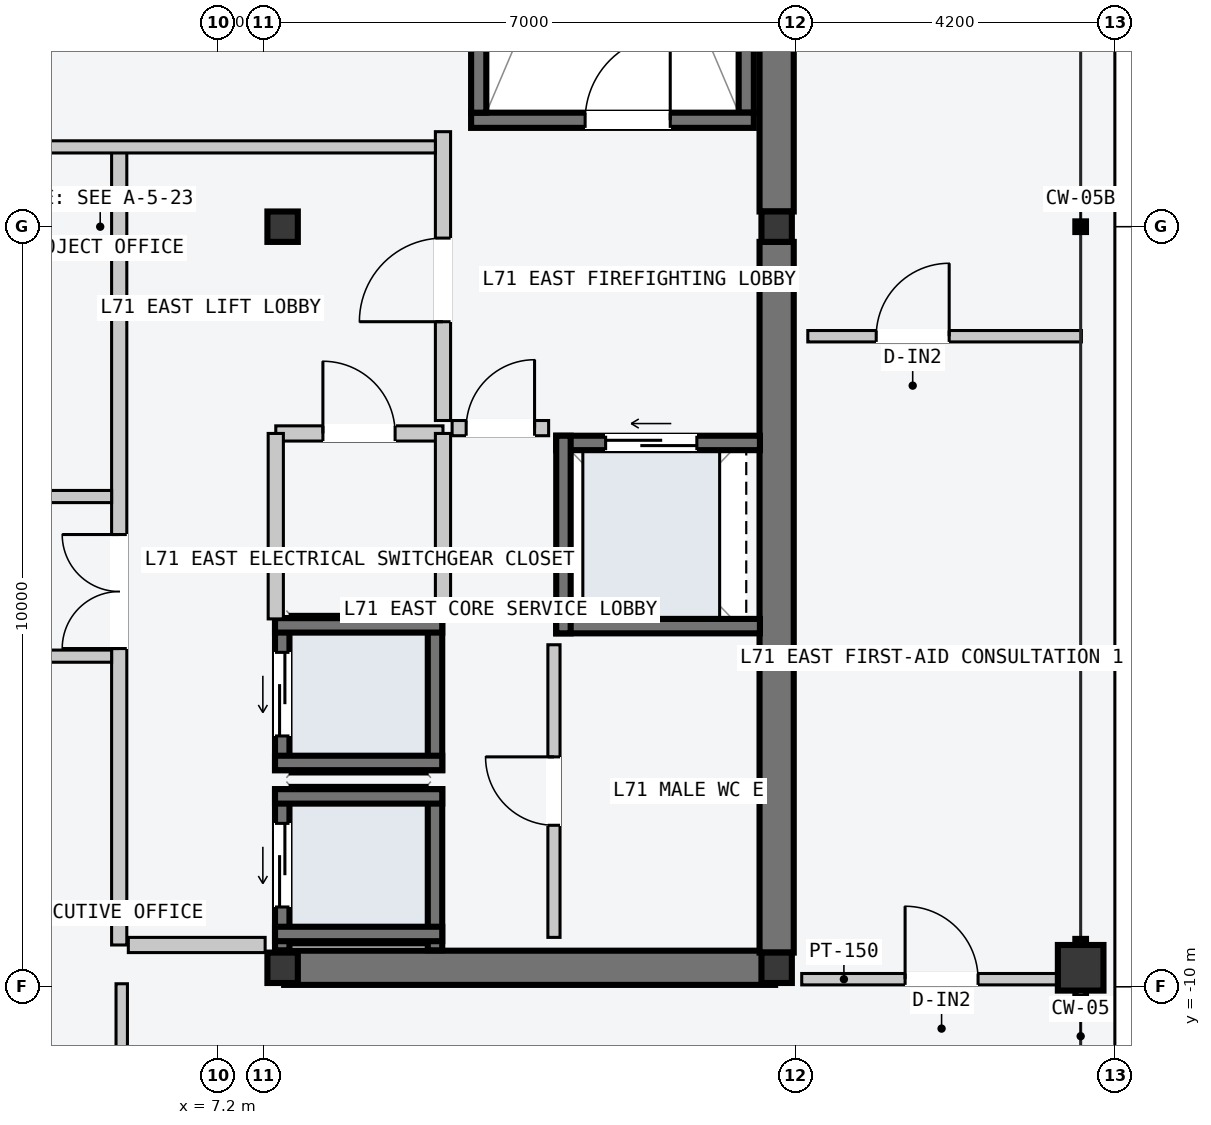
"""IFC4 building model, lengths in metres.
Left out: names, types, materials, properties, quantities, classifications, styles, units other than length and angle.
Written with IfcOpenShell. Run it as: python <this file> out.ifc"""

import sys

from ifc_helpers import new_model, si_unit, direction, frame, frame_2d, origin, origin_2d, place, context, subcontext, project, spatial, rectangle, hollow_rectangle, i_section, extrude, element, fill, save


model = new_model("IFC4")
c1 = context("Model", 3, precision=1e-05, world=origin(), true_north=direction((0.0, 1.0)))
c2 = subcontext(c1, "Body", "Model", "MODEL_VIEW")
j1 = project(units=[si_unit("LENGTHUNIT", "METRE"), si_unit("PLANEANGLEUNIT", "RADIAN")], contexts=[c1])
p1 = place(None, origin())
s1 = spatial("IfcSite", under=j1, at=p1, CompositionType="ELEMENT")
p2 = place(p1, origin())
s2 = spatial("IfcBuilding", under=s1, at=p2, CompositionType="ELEMENT")
p3 = place(p2, frame((0.0, 0.0, 268.8)))
s3 = spatial("IfcBuildingStorey", under=s2, at=p3, CompositionType="ELEMENT", Elevation=268.8)
p4 = place(p3, frame((8.07, -9.75, -0.2), z_axis=(0.0, 0.0, 1.0), x_axis=(1.0, 0.0, 0.0)))
e1 = element("IfcWall", 1, at=p4, inside=s3, PredefinedType="SHEAR", context=c2, shape_type="SweptSolid", body=[
    extrude(rectangle(XDim=6.46, YDim=0.45, at=frame_2d((3.23, 0.0))), origin(), (0.0, 0.0, 1.0), 3.6),
])
for number, where, z_axis, x_axis in (
    (2, (14.55, -9.55, -0.2), (0.0, 0.0, 1.0), (0.0, 1.0, 0.0)),
    (3, (14.55, 0.2, -0.2), (0.0, 0.0, 1.0), (0.0, 1.0, 0.0)),
):
    element("IfcWall", number, at=place(p3, frame(where, z_axis=z_axis, x_axis=x_axis)), inside=s3, PredefinedType="SHEAR", context=c2, shape_type="SweptSolid", body=[
        extrude(rectangle(XDim=9.35, YDim=0.45, at=frame_2d((4.675, 0.0))), origin(), (0.0, 0.0, 1.0), 3.6),
    ])
p5 = place(p3, frame((14.15, 1.5, -0.2), z_axis=(0.0, 0.0, 1.0), x_axis=(0.0, 1.0, 0.0)))
e4 = element("IfcWall", 4, at=p5, inside=s3, PredefinedType="SOLIDWALL", context=c2, shape_type="SweptSolid", body=[
    extrude(rectangle(XDim=7.8, YDim=0.2, at=frame_2d((3.9, 0.0))), origin(), (0.0, 0.0, 1.0), 3.6),
])
p6 = place(p3, frame((10.53, 1.4, -0.2), z_axis=(0.0, 0.0, 1.0), x_axis=(1.0, 0.0, 0.0)))
e5 = element("IfcWall", 5, at=p6, inside=s3, PredefinedType="SOLIDWALL", context=c2, shape_type="SweptSolid", body=[
    extrude(rectangle(XDim=3.72, YDim=0.2, at=frame_2d((1.86, 0.0))), origin(), (0.0, 0.0, 1.0), 3.6),
])
p7 = place(p6, frame((1.5, 0.0, 0.2)))
e6 = element("IfcOpeningElement", 6, at=p7, cuts=e5, PredefinedType="OPENING", context=c2, shape_type="SweptSolid", body=[
    extrude(rectangle(XDim=1.12, YDim=2.18, at=frame_2d((0.56, 1.09))), frame((0.0, 0.11, 0.0), z_axis=(0.0, -1.0, 0.0), x_axis=(1.0, 0.0, 0.0)), (0.0, 0.0, 1.0), 0.22),
])
p8 = place(p3, frame((10.63, 1.5, -0.2), z_axis=(0.0, 0.0, 1.0), x_axis=(0.0, 1.0, 0.0)))
e7 = element("IfcWall", 7, at=p8, inside=s3, PredefinedType="SOLIDWALL", context=c2, shape_type="SweptSolid", body=[
    extrude(rectangle(XDim=7.8, YDim=0.2, at=frame_2d((3.9, 0.0))), origin(), (0.0, 0.0, 1.0), 3.6),
])
for number, where, z_axis, x_axis in (
    (8, (8.05, -9.75, 0.0), (0.0, 0.0, 1.0), (1.0, 0.0, 0.0)),
    (9, (8.05, 0.0, 0.0), (0.0, 0.0, 1.0), (1.0, 0.0, 0.0)),
    (10, (14.55, -9.75, 0.0), (0.0, 0.0, 1.0), (1.0, 0.0, 0.0)),
    (11, (14.55, 0.0, 0.0), (0.0, 0.0, 1.0), (1.0, 0.0, 0.0)),
):
    element("IfcColumn", number, at=place(p3, frame(where, z_axis=z_axis, x_axis=x_axis)), inside=s3, PredefinedType="COLUMN", context=c2, shape_type="SweptSolid", body=[
        extrude(i_section(OverallWidth=0.4, OverallDepth=0.4, WebThickness=0.013, FlangeThickness=0.021, at=origin_2d()), origin(), (0.0, 0.0, 1.0), 3.6),
    ])
p9 = place(p3, frame((18.55, -9.75, 0.0), z_axis=(0.0, 0.0, 1.0), x_axis=(0.0, 1.0, 0.0)))
e12 = element("IfcColumn", 12, at=p9, inside=s3, PredefinedType="COLUMN", context=c2, shape_type="SweptSolid", body=[
    extrude(hollow_rectangle(XDim=0.6, YDim=0.6, WallThickness=0.025, at=origin_2d()), origin(), (0.0, 0.0, 1.0), 3.6),
])
p10 = place(p3, frame((8.045, -9.52, -0.2), z_axis=(0.0, 0.0, 1.0), x_axis=(0.0, 1.0, 0.0)))
e13 = element("IfcWall", 13, at=p10, inside=s3, PredefinedType="SOLIDWALL", context=c2, shape_type="SweptSolid", body=[
    extrude(rectangle(XDim=2.12, YDim=0.19, at=frame_2d((1.06, 0.0))), origin(), (0.0, 0.0, 1.0), 3.6),
])
p11 = place(p10, frame((0.57, 0.0, 0.2)))
e14 = element("IfcOpeningElement", 14, at=p11, cuts=e13, PredefinedType="OPENING", context=c2, shape_type="SweptSolid", body=[
    extrude(rectangle(XDim=1.1, YDim=2.2, at=frame_2d((0.55, 1.1))), frame((0.0, 0.105, 0.0), z_axis=(0.0, -1.0, 0.0), x_axis=(1.0, 0.0, 0.0)), (0.0, 0.0, 1.0), 0.21),
])
p12 = place(p3, frame((10.055, -9.52, -0.2), z_axis=(0.0, 0.0, 1.0), x_axis=(0.0, 1.0, 0.0)))
e15 = element("IfcWall", 15, at=p12, inside=s3, PredefinedType="SOLIDWALL", context=c2, shape_type="SweptSolid", body=[
    extrude(rectangle(XDim=2.12, YDim=0.19, at=frame_2d((1.06, 0.0))), origin(), (0.0, 0.0, 1.0), 3.6),
])
for number, where, z_axis, x_axis in (
    (16, (7.95, -7.495, -0.2), (0.0, 0.0, 1.0), (1.0, 0.0, 0.0)),
    (17, (7.95, -9.305, -0.2), (0.0, 0.0, 1.0), (1.0, 0.0, 0.0)),
):
    element("IfcWall", number, at=place(p3, frame(where, z_axis=z_axis, x_axis=x_axis)), inside=s3, PredefinedType="SOLIDWALL", context=c2, shape_type="SweptSolid", body=[
        extrude(rectangle(XDim=2.2, YDim=0.19, at=frame_2d((1.1, 0.0))), origin(), (0.0, 0.0, 1.0), 3.6),
    ])
p13 = place(p3, frame((8.045, -7.15, -0.2), z_axis=(0.0, 0.0, 1.0), x_axis=(0.0, 1.0, 0.0)))
e18 = element("IfcWall", 18, at=p13, inside=s3, PredefinedType="SOLIDWALL", context=c2, shape_type="SweptSolid", body=[
    extrude(rectangle(XDim=2.0, YDim=0.19, at=frame_2d((1.0, 0.0))), origin(), (0.0, 0.0, 1.0), 3.6),
])
p14 = place(p13, frame((0.45, 0.0, 0.2)))
e19 = element("IfcOpeningElement", 19, at=p14, cuts=e18, PredefinedType="OPENING", context=c2, shape_type="SweptSolid", body=[
    extrude(rectangle(XDim=1.1, YDim=2.2, at=frame_2d((0.55, 1.1))), frame((0.0, 0.105, 0.0), z_axis=(0.0, -1.0, 0.0), x_axis=(1.0, 0.0, 0.0)), (0.0, 0.0, 1.0), 0.21),
])
p15 = place(p3, frame((10.055, -7.15, -0.2), z_axis=(0.0, 0.0, 1.0), x_axis=(0.0, 1.0, 0.0)))
e20 = element("IfcWall", 20, at=p15, inside=s3, PredefinedType="SOLIDWALL", context=c2, shape_type="SweptSolid", body=[
    extrude(rectangle(XDim=2.0, YDim=0.19, at=frame_2d((1.0, 0.0))), origin(), (0.0, 0.0, 1.0), 3.6),
])
for number, where, z_axis, x_axis in (
    (21, (7.95, -5.245, -0.2), (0.0, 0.0, 1.0), (1.0, 0.0, 0.0)),
    (22, (7.95, -7.055, -0.2), (0.0, 0.0, 1.0), (1.0, 0.0, 0.0)),
):
    element("IfcWall", number, at=place(p3, frame(where, z_axis=z_axis, x_axis=x_axis)), inside=s3, PredefinedType="SOLIDWALL", context=c2, shape_type="SweptSolid", body=[
        extrude(rectangle(XDim=2.2, YDim=0.19, at=frame_2d((1.1, 0.0))), origin(), (0.0, 0.0, 1.0), 3.6),
    ])
p16 = place(p3, frame((11.65, -2.845, -0.2), z_axis=(0.0, 0.0, 1.0), x_axis=(1.0, 0.0, 0.0)))
e23 = element("IfcWall", 23, at=p16, inside=s3, PredefinedType="SOLIDWALL", context=c2, shape_type="SweptSolid", body=[
    extrude(rectangle(XDim=2.68, YDim=0.19, at=frame_2d((1.34, 0.0))), origin(), (0.0, 0.0, 1.0), 3.6),
])
p17 = place(p16, frame((0.65, 0.0, 0.2)))
e24 = element("IfcOpeningElement", 24, at=p17, cuts=e23, PredefinedType="OPENING", context=c2, shape_type="SweptSolid", body=[
    extrude(rectangle(XDim=1.2, YDim=2.2, at=frame_2d((0.6, 1.1))), frame((0.0, 0.105, 0.0), z_axis=(0.0, -1.0, 0.0), x_axis=(1.0, 0.0, 0.0)), (0.0, 0.0, 1.0), 0.21),
])
p18 = place(p3, frame((11.65, -5.255, -0.2), z_axis=(0.0, 0.0, 1.0), x_axis=(1.0, 0.0, 0.0)))
e25 = element("IfcWall", 25, at=p18, inside=s3, PredefinedType="SOLIDWALL", context=c2, shape_type="SweptSolid", body=[
    extrude(rectangle(XDim=2.68, YDim=0.19, at=frame_2d((1.34, 0.0))), origin(), (0.0, 0.0, 1.0), 3.6),
])
p19 = place(p3, frame((11.745, -5.35, -0.2), z_axis=(0.0, 0.0, 1.0), x_axis=(0.0, 1.0, 0.0)))
e26 = element("IfcWall", 26, at=p19, inside=s3, PredefinedType="SOLIDWALL", context=c2, shape_type="SweptSolid", body=[
    extrude(rectangle(XDim=2.6, YDim=0.19, at=frame_2d((1.3, 0.0))), origin(), (0.0, 0.0, 1.0), 3.6),
])
p20 = place(p3, frame((5.9, -9.45, 0.0), z_axis=(0.0, 0.0, 1.0), x_axis=(0.0, 1.0, 0.0)))
e27 = element("IfcWall", 27, at=p20, inside=s3, PredefinedType="PARTITIONING", context=c2, shape_type="SweptSolid", body=[
    extrude(rectangle(XDim=10.5, YDim=0.2, at=frame_2d((5.25, 0.0))), origin(), (0.0, 0.0, 1.0), 3.4),
])
p21 = place(p20, frame((3.9, 0.0, 0.0)))
e28 = element("IfcOpeningElement", 28, at=p21, cuts=e27, PredefinedType="OPENING", context=c2, shape_type="SweptSolid", body=[
    extrude(rectangle(XDim=1.5, YDim=2.2, at=frame_2d((0.75, 1.1))), frame((0.0, 0.11, 0.0), z_axis=(0.0, -1.0, 0.0), x_axis=(1.0, 0.0, 0.0)), (0.0, 0.0, 1.0), 0.22),
])
p22 = place(p3, frame((6.02, -9.45, 0.0), z_axis=(0.0, 0.0, 1.0), x_axis=(1.0, 0.0, 0.0)))
e29 = element("IfcWall", 29, at=p22, inside=s3, PredefinedType="PARTITIONING", context=c2, shape_type="SweptSolid", body=[
    extrude(rectangle(XDim=1.8, YDim=0.2, at=frame_2d((0.9, 0.0))), origin(), (0.0, 0.0, 1.0), 3.4),
])
p23 = place(p3, frame((10.16, -2.55, 0.0), z_axis=(0.0, 0.0, 1.0), x_axis=(0.0, 1.0, 0.0)))
e30 = element("IfcWall", 30, at=p23, inside=s3, PredefinedType="PARTITIONING", context=c2, shape_type="SweptSolid", body=[
    extrude(rectangle(XDim=3.8, YDim=0.2, at=frame_2d((1.9, 0.0))), origin(), (0.0, 0.0, 1.0), 3.4),
])
p24 = place(p23, frame((1.3, 0.0, 0.0)))
e31 = element("IfcOpeningElement", 31, at=p24, cuts=e30, PredefinedType="OPENING", context=c2, shape_type="SweptSolid", body=[
    extrude(rectangle(XDim=1.1, YDim=2.15, at=frame_2d((0.55, 1.075))), frame((0.0, 0.11, 0.0), z_axis=(0.0, -1.0, 0.0), x_axis=(1.0, 0.0, 0.0)), (0.0, 0.0, 1.0), 0.22),
])
p25 = place(p3, frame((10.28, -2.65, 0.0), z_axis=(0.0, 0.0, 1.0), x_axis=(1.0, 0.0, 0.0)))
e32 = element("IfcWall", 32, at=p25, inside=s3, PredefinedType="PARTITIONING", context=c2, shape_type="SweptSolid", body=[
    extrude(rectangle(XDim=1.27, YDim=0.2, at=frame_2d((0.635, 0.0))), origin(), (0.0, 0.0, 1.0), 3.4),
])
p26 = place(p25, frame((0.185, 0.0, 0.0)))
e33 = element("IfcOpeningElement", 33, at=p26, cuts=e32, PredefinedType="OPENING", context=c2, shape_type="SweptSolid", body=[
    extrude(rectangle(XDim=0.9, YDim=2.15, at=frame_2d((0.45, 1.075))), frame((0.0, 0.11, 0.0), z_axis=(0.0, -1.0, 0.0), x_axis=(1.0, 0.0, 0.0)), (0.0, 0.0, 1.0), 0.22),
])
p27 = place(p3, frame((7.96, -2.72, 0.0), z_axis=(0.0, 0.0, 1.0), x_axis=(1.0, 0.0, 0.0)))
e34 = element("IfcWall", 34, at=p27, inside=s3, PredefinedType="PARTITIONING", context=c2, shape_type="SweptSolid", body=[
    extrude(rectangle(XDim=2.2, YDim=0.2, at=frame_2d((1.1, 0.0))), origin(), (0.0, 0.0, 1.0), 3.4),
])
p28 = place(p27, frame((0.62, 0.0, 0.0)))
e35 = element("IfcOpeningElement", 35, at=p28, cuts=e34, PredefinedType="OPENING", context=c2, shape_type="SweptSolid", body=[
    extrude(rectangle(XDim=0.95, YDim=2.1, at=frame_2d((0.475, 1.05))), frame((0.0, 0.11, 0.0), z_axis=(0.0, -1.0, 0.0), x_axis=(1.0, 0.0, 0.0)), (0.0, 0.0, 1.0), 0.22),
])
for number, where, z_axis, x_axis in (
    (36, (7.96, -5.16, 0.0), (0.0, 0.0, 1.0), (0.0, 1.0, 0.0)),
    (37, (10.16, -5.16, 0.0), (0.0, 0.0, 1.0), (0.0, 1.0, 0.0)),
):
    element("IfcWall", number, at=place(p3, frame(where, z_axis=z_axis, x_axis=x_axis)), inside=s3, PredefinedType="PARTITIONING", context=c2, shape_type="SweptSolid", body=[
        extrude(rectangle(XDim=2.44, YDim=0.2, at=frame_2d((1.22, 0.0))), origin(), (0.0, 0.0, 1.0), 3.4),
    ])
p29 = place(p3, frame((11.62, -9.35, 0.0), z_axis=(0.0, 0.0, 1.0), x_axis=(0.0, 1.0, 0.0)))
e38 = element("IfcWall", 38, at=p29, inside=s3, PredefinedType="PARTITIONING", context=c2, shape_type="SweptSolid", body=[
    extrude(rectangle(XDim=3.85, YDim=0.16, at=frame_2d((1.925, 0.0))), origin(), (0.0, 0.0, 1.0), 3.4),
])
p30 = place(p29, frame((1.475, 0.0, 0.0)))
e39 = element("IfcOpeningElement", 39, at=p30, cuts=e38, PredefinedType="OPENING", context=c2, shape_type="SweptSolid", body=[
    extrude(rectangle(XDim=0.9, YDim=2.15, at=frame_2d((0.45, 1.075))), frame((0.0, 0.09, 0.0), z_axis=(0.0, -1.0, 0.0), x_axis=(1.0, 0.0, 0.0)), (0.0, 0.0, 1.0), 0.18),
])
p31 = place(p3, frame((3.01, 1.05, 0.0), z_axis=(0.0, 0.0, 1.0), x_axis=(1.0, 0.0, 0.0)))
e40 = element("IfcWall", 40, at=p31, inside=s3, PredefinedType="PARTITIONING", context=c2, shape_type="SweptSolid", body=[
    extrude(rectangle(XDim=7.05, YDim=0.16, at=frame_2d((3.525, 0.0))), origin(), (0.0, 0.0, 1.0), 3.4),
])
for number, where, z_axis, x_axis in (
    (41, (3.01, -3.55, 0.0), (0.0, 0.0, 1.0), (1.0, 0.0, 0.0)),
    (42, (3.01, -5.65, 0.0), (0.0, 0.0, 1.0), (1.0, 0.0, 0.0)),
):
    element("IfcWall", number, at=place(p3, frame(where, z_axis=z_axis, x_axis=x_axis)), inside=s3, PredefinedType="PARTITIONING", context=c2, shape_type="SweptSolid", body=[
        extrude(rectangle(XDim=2.79, YDim=0.16, at=frame_2d((1.395, 0.0))), origin(), (0.0, 0.0, 1.0), 3.4),
    ])
p32 = place(p3, frame((5.933, -17.56, 0.0), z_axis=(0.0, 0.0, 1.0), x_axis=(0.0, 1.0, 0.0)))
e43 = element("IfcWall", 43, at=p32, inside=s3, PredefinedType="PARTITIONING", context=c2, shape_type="SweptSolid", body=[
    extrude(rectangle(XDim=7.6, YDim=0.15, at=frame_2d((3.8, 0.0))), origin(), (0.0, 0.0, 1.0), 3.4),
])
p33 = place(p32, frame((1.05, 0.0, 0.0)))
e44 = element("IfcOpeningElement", 44, at=p33, cuts=e43, PredefinedType="OPENING", context=c2, shape_type="SweptSolid", body=[
    extrude(rectangle(XDim=0.96, YDim=2.18, at=frame_2d((0.48, 1.09))), frame((0.0, 0.085, 0.0), z_axis=(0.0, -1.0, 0.0), x_axis=(1.0, 0.0, 0.0)), (0.0, 0.0, 1.0), 0.17),
])
p34 = place(p3, frame((14.88, -9.9, 0.0), z_axis=(0.0, 0.0, 1.0), x_axis=(1.0, 0.0, 0.0)))
e45 = element("IfcWall", 45, at=p34, inside=s3, PredefinedType="PARTITIONING", context=c2, shape_type="SweptSolid", body=[
    extrude(rectangle(XDim=3.68, YDim=0.15, at=frame_2d((1.84, 0.0))), origin(), (0.0, 0.0, 1.0), 3.4),
])
p35 = place(p34, frame((1.36, 0.0, 0.0)))
e46 = element("IfcOpeningElement", 46, at=p35, cuts=e45, PredefinedType="OPENING", context=c2, shape_type="SweptSolid", body=[
    extrude(rectangle(XDim=0.96, YDim=2.18, at=frame_2d((0.48, 1.09))), frame((0.0, 0.085, 0.0), z_axis=(0.0, -1.0, 0.0), x_axis=(1.0, 0.0, 0.0)), (0.0, 0.0, 1.0), 0.17),
])
p36 = place(p3, frame((14.96, -1.441, 0.0), z_axis=(0.0, 0.0, 1.0), x_axis=(1.0, 0.0, 0.0)))
e47 = element("IfcWall", 47, at=p36, inside=s3, PredefinedType="PARTITIONING", context=c2, shape_type="SweptSolid", body=[
    extrude(rectangle(XDim=3.6, YDim=0.15, at=frame_2d((1.8, 0.0))), origin(), (0.0, 0.0, 1.0), 3.4),
])
p37 = place(p36, frame((0.9, 0.0, 0.0)))
e48 = element("IfcOpeningElement", 48, at=p37, cuts=e47, PredefinedType="OPENING", context=c2, shape_type="SweptSolid", body=[
    extrude(rectangle(XDim=0.96, YDim=2.18, at=frame_2d((0.48, 1.09))), frame((0.0, 0.085, 0.0), z_axis=(0.0, -1.0, 0.0), x_axis=(1.0, 0.0, 0.0)), (0.0, 0.0, 1.0), 0.17),
])
p38 = place(p7, origin())
e49 = element("IfcDoor", 49, at=p38, inside=s3, OperationType="SINGLE_SWING_RIGHT", PredefinedType="DOOR", context=c2, shape_type="SweptSolid", body=[
    extrude(rectangle(XDim=1.12, YDim=2.18, at=frame_2d((0.56, 1.09))), frame((0.0, 0.025, 0.0), z_axis=(0.0, -1.0, 0.0), x_axis=(1.0, 0.0, 0.0)), (0.0, 0.0, 1.0), 0.05),
])
fill(e6, e49)
p39 = place(p11, origin())
e50 = element("IfcDoor", 50, at=p39, inside=s3, OperationType="SLIDING_TO_LEFT", PredefinedType="DOOR", context=c2, shape_type="SweptSolid", body=[
    extrude(rectangle(XDim=1.1, YDim=2.2, at=frame_2d((0.55, 1.1))), frame((0.0, 0.025, 0.0), z_axis=(0.0, -1.0, 0.0), x_axis=(1.0, 0.0, 0.0)), (0.0, 0.0, 1.0), 0.05),
])
fill(e14, e50)
p40 = place(p14, origin())
e51 = element("IfcDoor", 51, at=p40, inside=s3, OperationType="SLIDING_TO_LEFT", PredefinedType="DOOR", context=c2, shape_type="SweptSolid", body=[
    extrude(rectangle(XDim=1.1, YDim=2.2, at=frame_2d((0.55, 1.1))), frame((0.0, 0.025, 0.0), z_axis=(0.0, -1.0, 0.0), x_axis=(1.0, 0.0, 0.0)), (0.0, 0.0, 1.0), 0.05),
])
fill(e19, e51)
p41 = place(p17, origin())
e52 = element("IfcDoor", 52, at=p41, inside=s3, OperationType="SLIDING_TO_LEFT", PredefinedType="DOOR", context=c2, shape_type="SweptSolid", body=[
    extrude(rectangle(XDim=1.2, YDim=2.2, at=frame_2d((0.6, 1.1))), frame((0.0, 0.025, 0.0), z_axis=(0.0, -1.0, 0.0), x_axis=(1.0, 0.0, 0.0)), (0.0, 0.0, 1.0), 0.05),
])
fill(e24, e52)
p42 = place(p21, origin())
e53 = element("IfcDoor", 53, at=p42, inside=s3, OperationType="DOUBLE_DOOR_SINGLE_SWING", PredefinedType="DOOR", context=c2, shape_type="SweptSolid", body=[
    extrude(rectangle(XDim=1.5, YDim=2.2, at=frame_2d((0.75, 1.1))), frame((0.0, 0.025, 0.0), z_axis=(0.0, -1.0, 0.0), x_axis=(1.0, 0.0, 0.0)), (0.0, 0.0, 1.0), 0.05),
])
fill(e28, e53)
p43 = place(p24, origin())
e54 = element("IfcDoor", 54, at=p43, inside=s3, OperationType="SINGLE_SWING_LEFT", PredefinedType="DOOR", context=c2, shape_type="SweptSolid", body=[
    extrude(rectangle(XDim=1.1, YDim=2.15, at=frame_2d((0.55, 1.075))), frame((0.0, 0.025, 0.0), z_axis=(0.0, -1.0, 0.0), x_axis=(1.0, 0.0, 0.0)), (0.0, 0.0, 1.0), 0.05),
])
fill(e31, e54)
p44 = place(p26, origin())
e55 = element("IfcDoor", 55, at=p44, inside=s3, OperationType="SINGLE_SWING_RIGHT", PredefinedType="DOOR", context=c2, shape_type="SweptSolid", body=[
    extrude(rectangle(XDim=0.9, YDim=2.15, at=frame_2d((0.45, 1.075))), frame((0.0, 0.025, 0.0), z_axis=(0.0, -1.0, 0.0), x_axis=(1.0, 0.0, 0.0)), (0.0, 0.0, 1.0), 0.05),
])
fill(e33, e55)
p45 = place(p28, origin())
e56 = element("IfcDoor", 56, at=p45, inside=s3, OperationType="SINGLE_SWING_LEFT", PredefinedType="DOOR", context=c2, shape_type="SweptSolid", body=[
    extrude(rectangle(XDim=0.95, YDim=2.1, at=frame_2d((0.475, 1.05))), frame((0.0, 0.025, 0.0), z_axis=(0.0, -1.0, 0.0), x_axis=(1.0, 0.0, 0.0)), (0.0, 0.0, 1.0), 0.05),
])
fill(e35, e56)
p46 = place(p30, origin())
e57 = element("IfcDoor", 57, at=p46, inside=s3, OperationType="SINGLE_SWING_RIGHT", PredefinedType="DOOR", context=c2, shape_type="SweptSolid", body=[
    extrude(rectangle(XDim=0.9, YDim=2.15, at=frame_2d((0.45, 1.075))), frame((0.0, 0.025, 0.0), z_axis=(0.0, -1.0, 0.0), x_axis=(1.0, 0.0, 0.0)), (0.0, 0.0, 1.0), 0.05),
])
fill(e39, e57)
p47 = place(p35, origin())
e58 = element("IfcDoor", 58, at=p47, inside=s3, OperationType="SINGLE_SWING_LEFT", PredefinedType="DOOR", context=c2, shape_type="SweptSolid", body=[
    extrude(rectangle(XDim=0.96, YDim=2.18, at=frame_2d((0.48, 1.09))), frame((0.0, 0.025, 0.0), z_axis=(0.0, -1.0, 0.0), x_axis=(1.0, 0.0, 0.0)), (0.0, 0.0, 1.0), 0.05),
])
fill(e46, e58)
p48 = place(p37, origin())
e59 = element("IfcDoor", 59, at=p48, inside=s3, OperationType="SINGLE_SWING_RIGHT", PredefinedType="DOOR", context=c2, shape_type="SweptSolid", body=[
    extrude(rectangle(XDim=0.96, YDim=2.18, at=frame_2d((0.48, 1.09))), frame((0.0, 0.025, 0.0), z_axis=(0.0, -1.0, 0.0), x_axis=(1.0, 0.0, 0.0)), (0.0, 0.0, 1.0), 0.05),
])
fill(e48, e59)
save(model, sys.argv[1])
